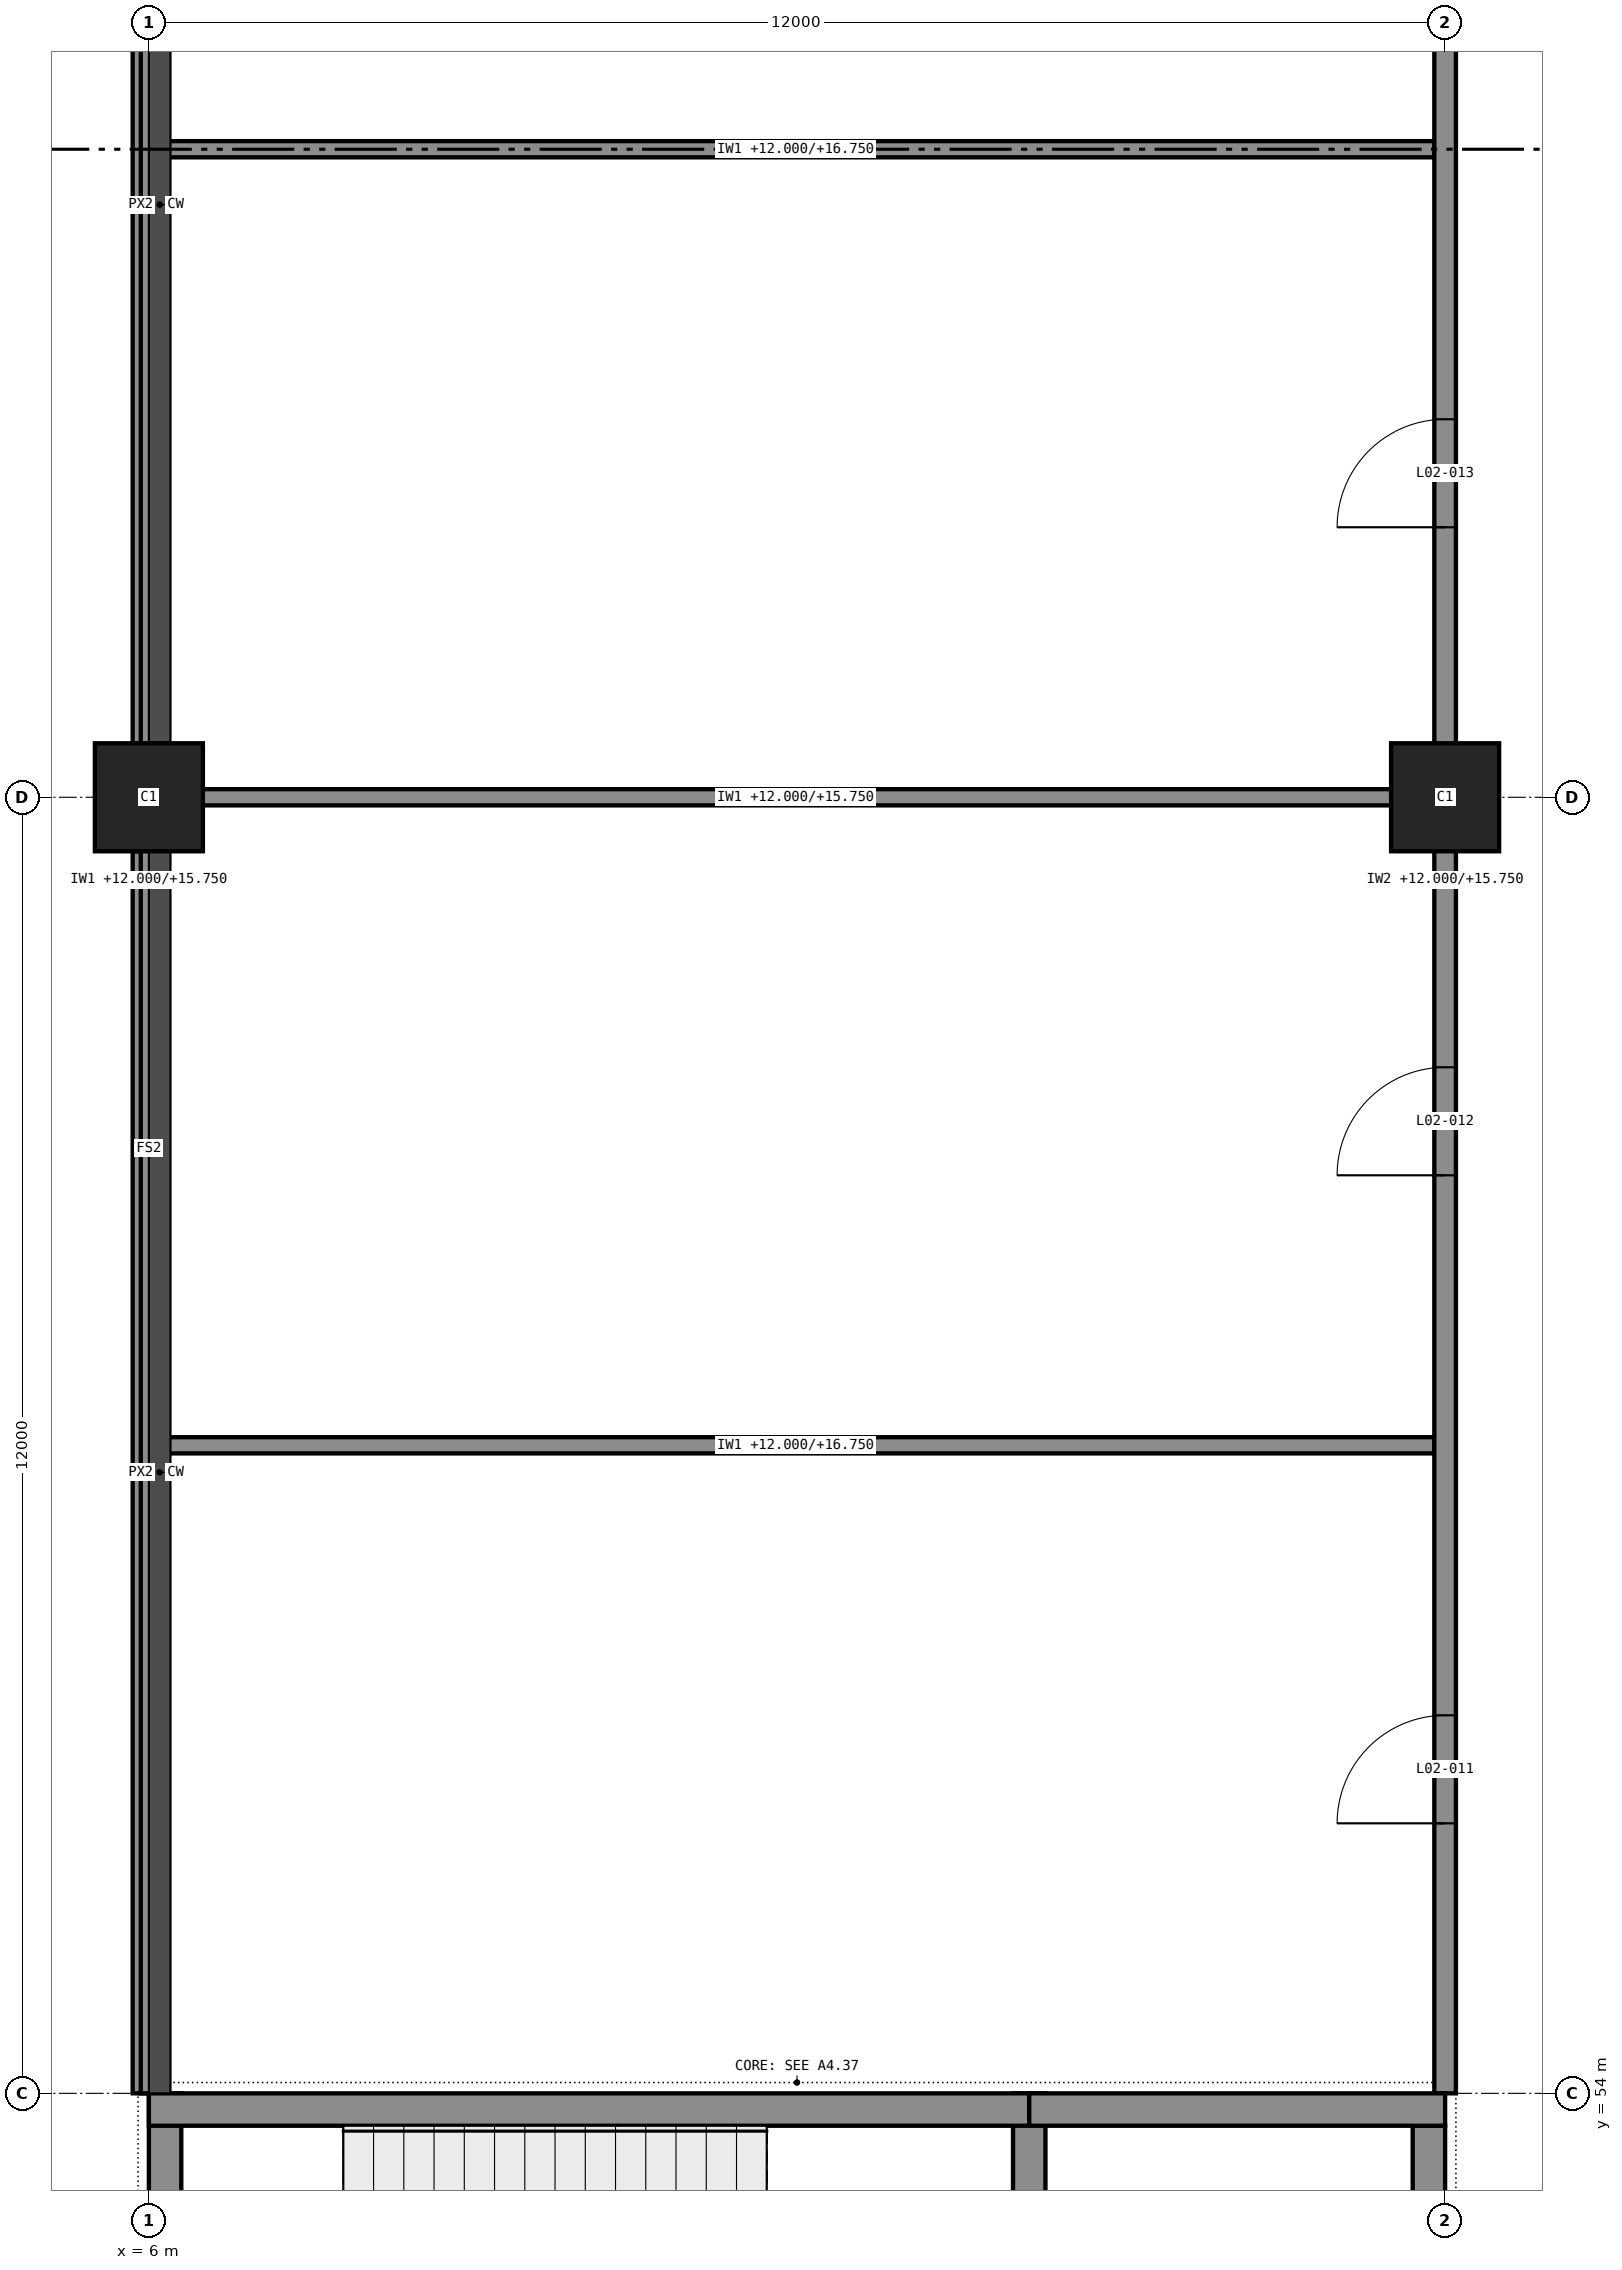
"""IFC4 building model, lengths in metres.
Left out: names, types, materials, properties, quantities, classifications, styles, units other than length and angle.
Written with IfcOpenShell. Run it as: python <this file> out.ifc"""

import sys

from ifc_helpers import new_model, si_unit, direction, frame, frame_2d, origin, origin_2d, place, context, subcontext, project, spatial, rectangle, extrude, element, fill, save


model = new_model("IFC4")
c1 = context("Model", 3, precision=1e-05, world=origin(), true_north=direction((0.0, 1.0)))
c2 = subcontext(c1, "Body", "Model", "MODEL_VIEW")
j1 = project(units=[si_unit("LENGTHUNIT", "METRE"), si_unit("PLANEANGLEUNIT", "RADIAN")], contexts=[c1])
p1 = place(None, origin())
s1 = spatial("IfcSite", under=j1, at=p1, CompositionType="ELEMENT")
p2 = place(p1, origin())
s2 = spatial("IfcBuilding", under=s1, at=p2, CompositionType="ELEMENT")
p3 = place(p2, frame((0.0, 0.0, 12.0)))
s3 = spatial("IfcBuildingStorey", under=s2, at=p3, CompositionType="ELEMENT", Elevation=12.0)
for number, where, z_axis, x_axis in (
    (1, (6.0, 66.0, 0.0), (0.0, 0.0, 1.0), (1.0, 0.0, 0.0)),
    (2, (18.0, 66.0, 0.0), (0.0, 0.0, 1.0), (1.0, 0.0, 0.0)),
):
    element("IfcColumn", number, at=place(p3, frame(where, z_axis=z_axis, x_axis=x_axis)), inside=s3, PredefinedType="COLUMN", context=c2, shape_type="SweptSolid", body=[
        extrude(rectangle(XDim=1.0, YDim=1.0, at=origin_2d()), origin(), (0.0, 0.0, 1.0), 5.0),
    ])
p4 = place(p3, frame((6.0, 53.85, 0.0), z_axis=(0.0, 0.0, 1.0), x_axis=(1.0, 0.0, 0.0)))
e3 = element("IfcWall", 3, at=p4, inside=s3, PredefinedType="SHEAR", context=c2, shape_type="SweptSolid", body=[
    extrude(rectangle(XDim=8.15, YDim=0.3, at=frame_2d((4.075, 0.0))), origin(), (0.0, 0.0, 1.0), 4.75),
])
p5 = place(p3, frame((14.15, 53.85, 0.0), z_axis=(0.0, 0.0, 1.0), x_axis=(1.0, 0.0, 0.0)))
e4 = element("IfcWall", 4, at=p5, inside=s3, PredefinedType="SHEAR", context=c2, shape_type="SweptSolid", body=[
    extrude(rectangle(XDim=3.85, YDim=0.3, at=frame_2d((1.925, 0.0))), origin(), (0.0, 0.0, 1.0), 4.75),
])
p6 = place(p3, frame((6.15, 50.55, 0.0), z_axis=(0.0, 0.0, 1.0), x_axis=(0.0, 1.0, 0.0)))
e5 = element("IfcWall", 5, at=p6, inside=s3, PredefinedType="SHEAR", context=c2, shape_type="SweptSolid", body=[
    extrude(rectangle(XDim=3.45, YDim=0.3, at=frame_2d((1.725, 0.0))), origin(), (0.0, 0.0, 1.0), 4.75),
])
p7 = place(p3, frame((17.85, 50.55, 0.0), z_axis=(0.0, 0.0, 1.0), x_axis=(0.0, 1.0, 0.0)))
e6 = element("IfcWall", 6, at=p7, inside=s3, PredefinedType="SHEAR", context=c2, shape_type="SweptSolid", body=[
    extrude(rectangle(XDim=3.15, YDim=0.3, at=frame_2d((1.575, 0.0))), origin(), (0.0, 0.0, 1.0), 4.75),
])
p8 = place(p7, frame((1.15, 0.0, 0.0)))
e7 = element("IfcOpeningElement", 7, at=p8, cuts=e6, PredefinedType="OPENING", context=c2, shape_type="SweptSolid", body=[
    extrude(rectangle(XDim=1.0, YDim=2.1, at=frame_2d((0.5, 1.05))), frame((0.0, 0.16, 0.0), z_axis=(0.0, -1.0, 0.0), x_axis=(1.0, 0.0, 0.0)), (0.0, 0.0, 1.0), 0.32),
])
p9 = place(p3, frame((14.15, 50.7, 0.0), z_axis=(0.0, 0.0, 1.0), x_axis=(0.0, 1.0, 0.0)))
e8 = element("IfcWall", 8, at=p9, inside=s3, PredefinedType="SHEAR", context=c2, shape_type="SweptSolid", body=[
    extrude(rectangle(XDim=3.3, YDim=0.3, at=frame_2d((1.65, 0.0))), origin(), (0.0, 0.0, 1.0), 4.75),
])
p10 = place(p3, frame((5.925, 77.5, 4.75), z_axis=(0.0, 0.0, 1.0), x_axis=(0.0, -1.0, 0.0)))
e9 = element("IfcWall", 9, at=p10, inside=s3, PredefinedType="STANDARD", context=c2, shape_type="SweptSolid", body=[
    extrude(rectangle(XDim=11.0, YDim=0.15, at=frame_2d((5.5, 0.0))), origin(), (0.0, 0.0, 1.0), 0.25),
])
p11 = place(p3, frame((5.925, 65.5, 4.75), z_axis=(0.0, 0.0, 1.0), x_axis=(0.0, -1.0, 0.0)))
e10 = element("IfcWall", 10, at=p11, inside=s3, PredefinedType="STANDARD", context=c2, shape_type="SweptSolid", body=[
    extrude(rectangle(XDim=11.5, YDim=0.15, at=frame_2d((5.75, 0.0))), origin(), (0.0, 0.0, 1.0), 0.25),
])
p12 = place(p3, frame((6.075, 60.0, 0.0), z_axis=(0.0, 0.0, 1.0), x_axis=(1.0, 0.0, 0.0)))
e11 = element("IfcWall", 11, at=p12, inside=s3, PredefinedType="PARTITIONING", context=c2, shape_type="SweptSolid", body=[
    extrude(rectangle(XDim=11.825, YDim=0.15, at=frame_2d((5.913, 0.0))), origin(), (0.0, 0.0, 1.0), 4.75),
])
p13 = place(p3, frame((6.075, 66.0, 0.0), z_axis=(0.0, 0.0, 1.0), x_axis=(1.0, 0.0, 0.0)))
e12 = element("IfcWall", 12, at=p13, inside=s3, PredefinedType="PARTITIONING", context=c2, shape_type="SweptSolid", body=[
    extrude(rectangle(XDim=11.825, YDim=0.15, at=frame_2d((5.913, 0.0))), origin(), (0.0, 0.0, 1.0), 3.75),
])
p14 = place(p3, frame((6.075, 72.0, 0.0), z_axis=(0.0, 0.0, 1.0), x_axis=(1.0, 0.0, 0.0)))
e13 = element("IfcWall", 13, at=p14, inside=s3, PredefinedType="PARTITIONING", context=c2, shape_type="SweptSolid", body=[
    extrude(rectangle(XDim=11.825, YDim=0.15, at=frame_2d((5.913, 0.0))), origin(), (0.0, 0.0, 1.0), 4.75),
])
p15 = place(p3, frame((6.0, 54.0, 0.0), z_axis=(0.0, 0.0, 1.0), x_axis=(0.0, 1.0, 0.0)))
e14 = element("IfcWall", 14, at=p15, inside=s3, PredefinedType="PARTITIONING", context=c2, shape_type="SweptSolid", body=[
    extrude(rectangle(XDim=36.0, YDim=0.15, at=frame_2d((18.0, 0.0))), origin(), (0.0, 0.0, 1.0), 3.75),
])
p16 = place(p3, frame((18.0, 54.0, 0.0), z_axis=(0.0, 0.0, 1.0), x_axis=(0.0, 1.0, 0.0)))
e15 = element("IfcWall", 15, at=p16, inside=s3, PredefinedType="PARTITIONING", context=c2, shape_type="SweptSolid", body=[
    extrude(rectangle(XDim=36.0, YDim=0.2, at=frame_2d((18.0, 0.0))), origin(), (0.0, 0.0, 1.0), 3.75),
])
p17 = place(p16, frame((2.5, 0.0, 0.0)))
e16 = element("IfcOpeningElement", 16, at=p17, cuts=e15, PredefinedType="OPENING", context=c2, shape_type="SweptSolid", body=[
    extrude(rectangle(XDim=1.0, YDim=2.1, at=frame_2d((0.5, 1.05))), frame((0.0, 0.11, 0.0), z_axis=(0.0, -1.0, 0.0), x_axis=(1.0, 0.0, 0.0)), (0.0, 0.0, 1.0), 0.22),
])
p18 = place(p16, frame((8.5, 0.0, 0.0)))
e17 = element("IfcOpeningElement", 17, at=p18, cuts=e15, PredefinedType="OPENING", context=c2, shape_type="SweptSolid", body=[
    extrude(rectangle(XDim=1.0, YDim=2.1, at=frame_2d((0.5, 1.05))), frame((0.0, 0.11, 0.0), z_axis=(0.0, -1.0, 0.0), x_axis=(1.0, 0.0, 0.0)), (0.0, 0.0, 1.0), 0.22),
])
p19 = place(p16, frame((14.5, 0.0, 0.0)))
e18 = element("IfcOpeningElement", 18, at=p19, cuts=e15, PredefinedType="OPENING", context=c2, shape_type="SweptSolid", body=[
    extrude(rectangle(XDim=1.0, YDim=2.1, at=frame_2d((0.5, 1.05))), frame((0.0, 0.11, 0.0), z_axis=(0.0, -1.0, 0.0), x_axis=(1.0, 0.0, 0.0)), (0.0, 0.0, 1.0), 0.22),
])
p20 = place(p16, frame((20.5, 0.0, 0.0)))
e19 = element("IfcOpeningElement", 19, at=p20, cuts=e15, PredefinedType="OPENING", context=c2, shape_type="SweptSolid", body=[
    extrude(rectangle(XDim=1.0, YDim=2.1, at=frame_2d((0.5, 1.05))), frame((0.0, 0.11, 0.0), z_axis=(0.0, -1.0, 0.0), x_axis=(1.0, 0.0, 0.0)), (0.0, 0.0, 1.0), 0.22),
])
p21 = place(p16, frame((26.5, 0.0, 0.0)))
e20 = element("IfcOpeningElement", 20, at=p21, cuts=e15, PredefinedType="OPENING", context=c2, shape_type="SweptSolid", body=[
    extrude(rectangle(XDim=1.0, YDim=2.1, at=frame_2d((0.5, 1.05))), frame((0.0, 0.11, 0.0), z_axis=(0.0, -1.0, 0.0), x_axis=(1.0, 0.0, 0.0)), (0.0, 0.0, 1.0), 0.22),
])
p22 = place(p16, frame((32.5, 0.0, 0.0)))
e21 = element("IfcOpeningElement", 21, at=p22, cuts=e15, PredefinedType="OPENING", context=c2, shape_type="SweptSolid", body=[
    extrude(rectangle(XDim=1.0, YDim=2.1, at=frame_2d((0.5, 1.05))), frame((0.0, 0.11, 0.0), z_axis=(0.0, -1.0, 0.0), x_axis=(1.0, 0.0, 0.0)), (0.0, 0.0, 1.0), 0.22),
])
p23 = place(p17, origin())
e22 = element("IfcDoor", 22, at=p23, inside=s3, OperationType="SINGLE_SWING_RIGHT", PredefinedType="DOOR", context=c2, shape_type="SweptSolid", body=[
    extrude(rectangle(XDim=1.0, YDim=2.1, at=frame_2d((0.5, 1.05))), frame((0.0, 0.025, 0.0), z_axis=(0.0, -1.0, 0.0), x_axis=(1.0, 0.0, 0.0)), (0.0, 0.0, 1.0), 0.05),
])
fill(e16, e22)
p24 = place(p18, origin())
e23 = element("IfcDoor", 23, at=p24, inside=s3, OperationType="SINGLE_SWING_RIGHT", PredefinedType="DOOR", context=c2, shape_type="SweptSolid", body=[
    extrude(rectangle(XDim=1.0, YDim=2.1, at=frame_2d((0.5, 1.05))), frame((0.0, 0.025, 0.0), z_axis=(0.0, -1.0, 0.0), x_axis=(1.0, 0.0, 0.0)), (0.0, 0.0, 1.0), 0.05),
])
fill(e17, e23)
p25 = place(p19, origin())
e24 = element("IfcDoor", 24, at=p25, inside=s3, OperationType="SINGLE_SWING_RIGHT", PredefinedType="DOOR", context=c2, shape_type="SweptSolid", body=[
    extrude(rectangle(XDim=1.0, YDim=2.1, at=frame_2d((0.5, 1.05))), frame((0.0, 0.025, 0.0), z_axis=(0.0, -1.0, 0.0), x_axis=(1.0, 0.0, 0.0)), (0.0, 0.0, 1.0), 0.05),
])
fill(e18, e24)
save(model, sys.argv[1])
